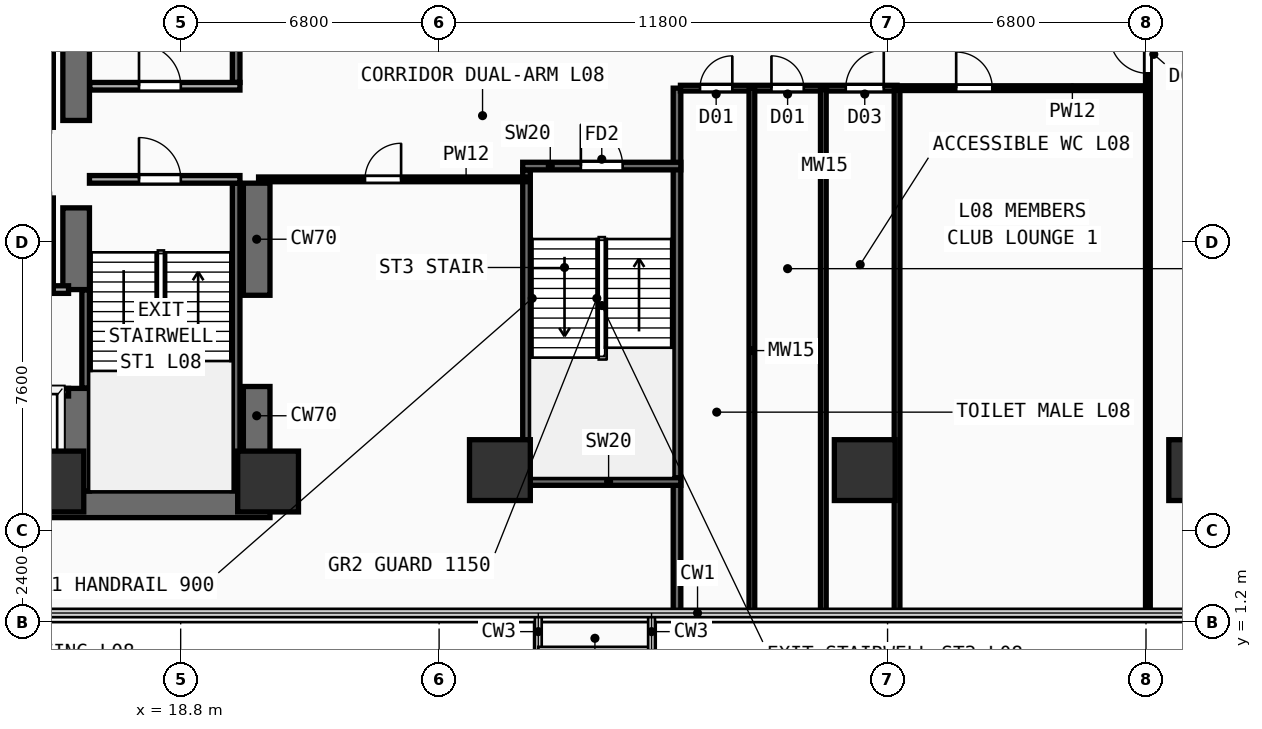
"""IFC4 building model, lengths in metres.
Left out: names, types, materials, properties, quantities, classifications, styles, units other than length and angle.
Written with IfcOpenShell. Run it as: python <this file> out.ifc"""

import sys

from ifc_helpers import new_model, si_unit, direction, frame, frame_2d, origin, origin_2d, place, context, subcontext, project, spatial, rectangle, extrude, element, fill, save


model = new_model("IFC4")
c1 = context("Model", 3, precision=1e-05, world=origin(), true_north=direction((0.0, 1.0)))
c2 = subcontext(c1, "Body", "Model", "MODEL_VIEW")
j1 = project(units=[si_unit("LENGTHUNIT", "METRE"), si_unit("PLANEANGLEUNIT", "RADIAN")], contexts=[c1])
p1 = place(None, origin())
s1 = spatial("IfcSite", under=j1, at=p1, CompositionType="ELEMENT")
p2 = place(p1, origin())
s2 = spatial("IfcBuilding", under=s1, at=p2, CompositionType="ELEMENT")
p3 = place(p2, frame((0.0, 0.0, 33.4)))
s3 = spatial("IfcBuildingStorey", under=s2, at=p3, CompositionType="ELEMENT", Elevation=33.4)
p4 = place(p3, frame((7.1, 4.3, 0.0), z_axis=(0.0, 0.0, 1.0), x_axis=(1.0, 0.0, 0.0)))
e1 = element("IfcWall", 1, at=p4, inside=s3, PredefinedType="SHEAR", context=c2, shape_type="SweptSolid", body=[
    extrude(rectangle(XDim=14.05, YDim=0.7, at=frame_2d((7.025, 0.0))), origin(), (0.0, 0.0, 1.0), 3.54),
])
p5 = place(p3, frame((20.8, 4.65, 0.0), z_axis=(0.0, 0.0, 1.0), x_axis=(0.0, 1.0, 0.0)))
e2 = element("IfcWall", 2, at=p5, inside=s3, PredefinedType="SHEAR", context=c2, shape_type="SweptSolid", body=[
    extrude(rectangle(XDim=2.75, YDim=0.7, at=frame_2d((1.375, 0.0))), origin(), (0.0, 0.0, 1.0), 3.54),
])
p6 = place(p3, frame((20.8, 9.8, 0.0), z_axis=(0.0, 0.0, 1.0), x_axis=(0.0, 1.0, 0.0)))
e3 = element("IfcWall", 3, at=p6, inside=s3, PredefinedType="SHEAR", context=c2, shape_type="SweptSolid", body=[
    extrude(rectangle(XDim=2.95, YDim=0.7, at=frame_2d((1.475, 0.0))), origin(), (0.0, 0.0, 1.0), 3.54),
])
p7 = place(p3, frame((16.05, 4.65, 0.0), z_axis=(0.0, 0.0, 1.0), x_axis=(0.0, 1.0, 0.0)))
e4 = element("IfcWall", 4, at=p7, inside=s3, PredefinedType="SHEAR", context=c2, shape_type="SweptSolid", body=[
    extrude(rectangle(XDim=2.7, YDim=0.7, at=frame_2d((1.35, 0.0))), origin(), (0.0, 0.0, 1.0), 3.54),
])
p8 = place(p3, frame((16.05, 9.95, 0.0), z_axis=(0.0, 0.0, 1.0), x_axis=(0.0, 1.0, 0.0)))
e5 = element("IfcWall", 5, at=p8, inside=s3, PredefinedType="SHEAR", context=c2, shape_type="SweptSolid", body=[
    extrude(rectangle(XDim=2.15, YDim=0.7, at=frame_2d((1.075, 0.0))), origin(), (0.0, 0.0, 1.0), 3.54),
])
p9 = place(p3, frame((16.05, 14.4, 0.0), z_axis=(0.0, 0.0, 1.0), x_axis=(0.0, 1.0, 0.0)))
e6 = element("IfcWall", 6, at=p9, inside=s3, PredefinedType="SHEAR", context=c2, shape_type="SweptSolid", body=[
    extrude(rectangle(XDim=9.1, YDim=0.7, at=frame_2d((4.55, 0.0))), origin(), (0.0, 0.0, 1.0), 3.54),
])
for number, where, z_axis, x_axis in (
    (7, (15.45, 4.9, 0.0), (0.0, 0.0, 1.0), (1.0, 0.0, 0.0)),
    (8, (21.1, 4.9, 0.0), (0.0, 0.0, 1.0), (1.0, 0.0, 0.0)),
    (9, (27.2, 5.2, 0.0), (0.0, 0.0, 1.0), (1.0, 0.0, 0.0)),
    (10, (36.8, 5.2, 0.0), (0.0, 0.0, 1.0), (1.0, 0.0, 0.0)),
    (11, (45.6, 5.2, 0.0), (0.0, 0.0, 1.0), (1.0, 0.0, 0.0)),
):
    element("IfcColumn", number, at=place(p3, frame(where, z_axis=z_axis, x_axis=x_axis)), inside=s3, PredefinedType="COLUMN", context=c2, shape_type="SweptSolid", body=[
        extrude(rectangle(XDim=1.6, YDim=1.6, at=origin_2d()), origin(), (0.0, 0.0, 1.0), 3.54),
    ])
p10 = place(p3, frame((16.3, 7.36, 0.0), z_axis=(0.0, 0.0, 1.0), x_axis=(0.0, 1.0, 0.0)))
e12 = element("IfcWall", 12, at=p10, inside=s3, PredefinedType="SHEAR", context=c2, shape_type="SweptSolid", body=[
    extrude(rectangle(XDim=2.58, YDim=0.2, at=frame_2d((1.29, 0.0))), origin(), (0.0, 0.0, 1.0), 3.54),
])
p11 = place(p3, frame((20.26, 4.66, 0.0), z_axis=(0.0, 0.0, 1.0), x_axis=(0.0, 1.0, 0.0)))
e13 = element("IfcWall", 13, at=p11, inside=s3, PredefinedType="SHEAR", context=c2, shape_type="SweptSolid", body=[
    extrude(rectangle(XDim=8.09, YDim=0.2, at=frame_2d((4.045, 0.0))), origin(), (0.0, 0.0, 1.0), 3.54),
])
p12 = place(p3, frame((16.4, 12.85, 0.0), z_axis=(0.0, 0.0, 1.0), x_axis=(1.0, 0.0, 0.0)))
e14 = element("IfcWall", 14, at=p12, inside=s3, PredefinedType="PARTITIONING", context=c2, shape_type="SweptSolid", body=[
    extrude(rectangle(XDim=3.96, YDim=0.2, at=frame_2d((1.98, 0.0))), origin(), (0.0, 0.0, 1.0), 3.54),
])
p13 = place(p12, frame((1.304, 0.0, 0.0)))
e15 = element("IfcOpeningElement", 15, at=p13, cuts=e14, PredefinedType="OPENING", context=c2, shape_type="SweptSolid", body=[
    extrude(rectangle(XDim=1.1, YDim=2.2, at=frame_2d((0.55, 1.1))), frame((0.0, 0.11, 0.0), z_axis=(0.0, -1.0, 0.0), x_axis=(1.0, 0.0, 0.0)), (0.0, 0.0, 1.0), 0.22),
])
p14 = place(p3, frame((20.26, 15.4, 0.0), z_axis=(0.0, 0.0, 1.0), x_axis=(0.0, 1.0, 0.0)))
e16 = element("IfcWall", 16, at=p14, inside=s3, PredefinedType="SHEAR", context=c2, shape_type="SweptSolid", body=[
    extrude(rectangle(XDim=8.09, YDim=0.2, at=frame_2d((4.045, 0.0))), origin(), (0.0, 0.0, 1.0), 3.54),
])
p15 = place(p3, frame((16.41, 15.3, 0.0), z_axis=(0.0, 0.0, 1.0), x_axis=(1.0, 0.0, 0.0)))
e17 = element("IfcWall", 17, at=p15, inside=s3, PredefinedType="PARTITIONING", context=c2, shape_type="SweptSolid", body=[
    extrude(rectangle(XDim=3.95, YDim=0.2, at=frame_2d((1.975, 0.0))), origin(), (0.0, 0.0, 1.0), 3.54),
])
p16 = place(p15, frame((1.294, 0.0, 0.0)))
e18 = element("IfcOpeningElement", 18, at=p16, cuts=e17, PredefinedType="OPENING", context=c2, shape_type="SweptSolid", body=[
    extrude(rectangle(XDim=1.1, YDim=2.2, at=frame_2d((0.55, 1.1))), frame((0.0, 0.11, 0.0), z_axis=(0.0, -1.0, 0.0), x_axis=(1.0, 0.0, 0.0)), (0.0, 0.0, 1.0), 0.22),
])
p17 = place(p3, frame((27.9, 5.0, 0.0), z_axis=(0.0, 0.0, 1.0), x_axis=(0.0, 1.0, 0.0)))
e19 = element("IfcWall", 19, at=p17, inside=s3, PredefinedType="SHEAR", context=c2, shape_type="SweptSolid", body=[
    extrude(rectangle(XDim=8.1, YDim=0.2, at=frame_2d((4.05, 0.0))), origin(), (0.0, 0.0, 1.0), 3.54),
])
p18 = place(p3, frame((31.86, 1.44, 0.0), z_axis=(0.0, 0.0, 1.0), x_axis=(0.0, 1.0, 0.0)))
e20 = element("IfcWall", 20, at=p18, inside=s3, PredefinedType="SHEAR", context=c2, shape_type="SweptSolid", body=[
    extrude(rectangle(XDim=13.81, YDim=0.2, at=frame_2d((6.905, 0.0))), origin(), (0.0, 0.0, 1.0), 3.54),
])
p19 = place(p3, frame((27.8, 4.9, 0.0), z_axis=(0.0, 0.0, 1.0), x_axis=(1.0, 0.0, 0.0)))
e21 = element("IfcWall", 21, at=p19, inside=s3, PredefinedType="SHEAR", context=c2, shape_type="SweptSolid", body=[
    extrude(rectangle(XDim=4.16, YDim=0.2, at=frame_2d((2.08, 0.0))), origin(), (0.0, 0.0, 1.0), 3.54),
])
p20 = place(p3, frame((27.8, 13.2, 0.0), z_axis=(0.0, 0.0, 1.0), x_axis=(1.0, 0.0, 0.0)))
e22 = element("IfcWall", 22, at=p20, inside=s3, PredefinedType="SHEAR", context=c2, shape_type="SweptSolid", body=[
    extrude(rectangle(XDim=4.16, YDim=0.2, at=frame_2d((2.08, 0.0))), origin(), (0.0, 0.0, 1.0), 3.54),
])
p21 = place(p20, frame((1.53, 0.0, 0.0)))
e23 = element("IfcOpeningElement", 23, at=p21, cuts=e22, PredefinedType="OPENING", context=c2, shape_type="SweptSolid", body=[
    extrude(rectangle(XDim=1.1, YDim=2.2, at=frame_2d((0.55, 1.1))), frame((0.0, 0.11, 0.0), z_axis=(0.0, -1.0, 0.0), x_axis=(1.0, 0.0, 0.0)), (0.0, 0.0, 1.0), 0.22),
])
p22 = place(p3, frame((7.5, 7.25, 0.0), z_axis=(0.0, 0.0, 1.0), x_axis=(1.0, 0.0, 0.0)))
e24 = element("IfcWall", 24, at=p22, inside=s3, PredefinedType="PARTITIONING", context=c2, shape_type="SweptSolid", body=[
    extrude(rectangle(XDim=8.35, YDim=0.2, at=frame_2d((4.175, 0.0))), origin(), (0.0, 0.0, 1.0), 3.54),
])
p23 = place(p22, frame((0.53, 0.0, 0.0)))
e25 = element("IfcOpeningElement", 25, at=p23, cuts=e24, PredefinedType="OPENING", context=c2, shape_type="SweptSolid", body=[
    extrude(rectangle(XDim=1.1, YDim=2.2, at=frame_2d((0.55, 1.1))), frame((0.0, 0.11, 0.0), z_axis=(0.0, -1.0, 0.0), x_axis=(1.0, 0.0, 0.0)), (0.0, 0.0, 1.0), 0.22),
])
p24 = place(p22, frame((2.37, 0.0, 0.0)))
e26 = element("IfcOpeningElement", 26, at=p24, cuts=e24, PredefinedType="OPENING", context=c2, shape_type="SweptSolid", body=[
    extrude(rectangle(XDim=1.1, YDim=2.2, at=frame_2d((0.55, 1.1))), frame((0.0, 0.11, 0.0), z_axis=(0.0, -1.0, 0.0), x_axis=(1.0, 0.0, 0.0)), (0.0, 0.0, 1.0), 0.22),
])
p25 = place(p22, frame((4.33, 0.0, 0.0)))
e27 = element("IfcOpeningElement", 27, at=p25, cuts=e24, PredefinedType="OPENING", context=c2, shape_type="SweptSolid", body=[
    extrude(rectangle(XDim=1.1, YDim=2.2, at=frame_2d((0.55, 1.1))), frame((0.0, 0.11, 0.0), z_axis=(0.0, -1.0, 0.0), x_axis=(1.0, 0.0, 0.0)), (0.0, 0.0, 1.0), 0.22),
])
p26 = place(p22, frame((6.5, 0.0, 0.0)))
e28 = element("IfcOpeningElement", 28, at=p26, cuts=e24, PredefinedType="OPENING", context=c2, shape_type="SweptSolid", body=[
    extrude(rectangle(XDim=1.1, YDim=2.2, at=frame_2d((0.55, 1.1))), frame((0.0, 0.11, 0.0), z_axis=(0.0, -1.0, 0.0), x_axis=(1.0, 0.0, 0.0)), (0.0, 0.0, 1.0), 0.22),
])
p27 = place(p3, frame((7.5, 9.95, 0.0), z_axis=(0.0, 0.0, 1.0), x_axis=(1.0, 0.0, 0.0)))
e29 = element("IfcWall", 29, at=p27, inside=s3, PredefinedType="PARTITIONING", context=c2, shape_type="SweptSolid", body=[
    extrude(rectangle(XDim=8.35, YDim=0.2, at=frame_2d((4.175, 0.0))), origin(), (0.0, 0.0, 1.0), 3.54),
])
p28 = place(p3, frame((15.35, 9.95, 0.0), z_axis=(0.0, 0.0, 1.0), x_axis=(0.0, 1.0, 0.0)))
e30 = element("IfcWall", 30, at=p28, inside=s3, PredefinedType="PARTITIONING", context=c2, shape_type="SweptSolid", body=[
    extrude(rectangle(XDim=2.41, YDim=0.2, at=frame_2d((1.205, 0.0))), origin(), (0.0, 0.0, 1.0), 3.54),
])
p29 = place(p3, frame((15.35, 14.22, 0.0), z_axis=(0.0, 0.0, 1.0), x_axis=(0.0, 1.0, 0.0)))
e31 = element("IfcWall", 31, at=p29, inside=s3, PredefinedType="PARTITIONING", context=c2, shape_type="SweptSolid", body=[
    extrude(rectangle(XDim=2.23, YDim=0.2, at=frame_2d((1.115, 0.0))), origin(), (0.0, 0.0, 1.0), 3.54),
])
p30 = place(p3, frame((31.95, 15.25, 0.0), z_axis=(0.0, 0.0, 1.0), x_axis=(1.0, 0.0, 0.0)))
e32 = element("IfcWall", 32, at=p30, inside=s3, PredefinedType="PLUMBINGWALL", context=c2, shape_type="SweptSolid", body=[
    extrude(rectangle(XDim=5.7, YDim=0.15, at=frame_2d((2.85, 0.0))), origin(), (0.0, 0.0, 1.0), 3.04),
])
p31 = place(p30, frame((0.515, 0.0, 0.0)))
e33 = element("IfcOpeningElement", 33, at=p31, cuts=e32, PredefinedType="OPENING", context=c2, shape_type="SweptSolid", body=[
    extrude(rectangle(XDim=0.85, YDim=2.15, at=frame_2d((0.425, 1.075))), frame((0.0, 0.085, 0.0), z_axis=(0.0, -1.0, 0.0), x_axis=(1.0, 0.0, 0.0)), (0.0, 0.0, 1.0), 0.17),
])
p32 = place(p30, frame((2.395, 0.0, 0.0)))
e34 = element("IfcOpeningElement", 34, at=p32, cuts=e32, PredefinedType="OPENING", context=c2, shape_type="SweptSolid", body=[
    extrude(rectangle(XDim=0.85, YDim=2.15, at=frame_2d((0.425, 1.075))), frame((0.0, 0.085, 0.0), z_axis=(0.0, -1.0, 0.0), x_axis=(1.0, 0.0, 0.0)), (0.0, 0.0, 1.0), 0.17),
])
p33 = place(p30, frame((4.35, 0.0, 0.0)))
e35 = element("IfcOpeningElement", 35, at=p33, cuts=e32, PredefinedType="OPENING", context=c2, shape_type="SweptSolid", body=[
    extrude(rectangle(XDim=1.0, YDim=2.2, at=frame_2d((0.5, 1.1))), frame((0.0, 0.085, 0.0), z_axis=(0.0, -1.0, 0.0), x_axis=(1.0, 0.0, 0.0)), (0.0, 0.0, 1.0), 0.17),
])
for number, where, z_axis, x_axis in (
    (36, (33.83, 1.44, 0.0), (0.0, 0.0, 1.0), (0.0, 1.0, 0.0)),
    (37, (35.71, 1.44, 0.0), (0.0, 0.0, 1.0), (0.0, 1.0, 0.0)),
    (38, (37.65, 1.44, 0.0), (0.0, 0.0, 1.0), (0.0, 1.0, 0.0)),
):
    element("IfcWall", number, at=place(p3, frame(where, z_axis=z_axis, x_axis=x_axis)), inside=s3, PredefinedType="PLUMBINGWALL", context=c2, shape_type="SweptSolid", body=[
        extrude(rectangle(XDim=13.81, YDim=0.15, at=frame_2d((6.905, 0.0))), origin(), (0.0, 0.0, 1.0), 3.54),
    ])
p34 = place(p3, frame((20.85, 12.85, 0.0), z_axis=(0.0, 0.0, 1.0), x_axis=(1.0, 0.0, 0.0)))
e39 = element("IfcWall", 39, at=p34, inside=s3, PredefinedType="PARTITIONING", context=c2, shape_type="SweptSolid", body=[
    extrude(rectangle(XDim=7.05, YDim=0.125, at=frame_2d((3.525, 0.0))), origin(), (0.0, 0.0, 1.0), 3.54),
])
p35 = place(p34, frame((2.8, 0.0, 0.0)))
e40 = element("IfcOpeningElement", 40, at=p35, cuts=e39, PredefinedType="OPENING", context=c2, shape_type="SweptSolid", body=[
    extrude(rectangle(XDim=0.95, YDim=2.15, at=frame_2d((0.475, 1.075))), frame((0.0, 0.073, 0.0), z_axis=(0.0, -1.0, 0.0), x_axis=(1.0, 0.0, 0.0)), (0.0, 0.0, 1.0), 0.145),
])
p36 = place(p3, frame((37.65, 15.25, 0.0), z_axis=(0.0, 0.0, 1.0), x_axis=(1.0, 0.0, 0.0)))
e41 = element("IfcWall", 41, at=p36, inside=s3, PredefinedType="PARTITIONING", context=c2, shape_type="SweptSolid", body=[
    extrude(rectangle(XDim=6.6, YDim=0.125, at=frame_2d((3.3, 0.0))), origin(), (0.0, 0.0, 1.0), 3.04),
])
p37 = place(p36, frame((1.556, 0.0, 0.0)))
e42 = element("IfcOpeningElement", 42, at=p37, cuts=e41, PredefinedType="OPENING", context=c2, shape_type="SweptSolid", body=[
    extrude(rectangle(XDim=0.95, YDim=2.15, at=frame_2d((0.475, 1.075))), frame((0.0, 0.073, 0.0), z_axis=(0.0, -1.0, 0.0), x_axis=(1.0, 0.0, 0.0)), (0.0, 0.0, 1.0), 0.145),
])
p38 = place(p3, frame((44.25, 1.44, 0.0), z_axis=(0.0, 0.0, 1.0), x_axis=(0.0, 1.0, 0.0)))
e43 = element("IfcWall", 43, at=p38, inside=s3, PredefinedType="PARTITIONING", context=c2, shape_type="SweptSolid", body=[
    extrude(rectangle(XDim=22.12, YDim=0.125, at=frame_2d((11.06, 0.0))), origin(), (0.0, 0.0, 1.0), 3.54),
])
p39 = place(p38, frame((14.2, 0.0, 0.0)))
e44 = element("IfcOpeningElement", 44, at=p39, cuts=e43, PredefinedType="OPENING", context=c2, shape_type="SweptSolid", body=[
    extrude(rectangle(XDim=1.0, YDim=2.2, at=frame_2d((0.5, 1.1))), frame((0.0, 0.073, 0.0), z_axis=(0.0, -1.0, 0.0), x_axis=(1.0, 0.0, 0.0)), (0.0, 0.0, 1.0), 0.145),
])
p40 = place(p13, frame((1.1, 0.0, 0.0), z_axis=(0.0, 0.0, 1.0), x_axis=(-1.0, 0.0, 0.0)))
e45 = element("IfcDoor", 45, at=p40, inside=s3, OperationType="SINGLE_SWING_RIGHT", PredefinedType="DOOR", context=c2, shape_type="SweptSolid", body=[
    extrude(rectangle(XDim=1.1, YDim=2.2, at=frame_2d((0.55, 1.1))), frame((0.0, 0.025, 0.0), z_axis=(0.0, -1.0, 0.0), x_axis=(1.0, 0.0, 0.0)), (0.0, 0.0, 1.0), 0.05),
])
fill(e15, e45)
p41 = place(p16, origin())
e46 = element("IfcDoor", 46, at=p41, inside=s3, OperationType="SINGLE_SWING_LEFT", PredefinedType="DOOR", context=c2, shape_type="SweptSolid", body=[
    extrude(rectangle(XDim=1.1, YDim=2.2, at=frame_2d((0.55, 1.1))), frame((0.0, 0.025, 0.0), z_axis=(0.0, -1.0, 0.0), x_axis=(1.0, 0.0, 0.0)), (0.0, 0.0, 1.0), 0.05),
])
fill(e18, e46)
p42 = place(p21, frame((1.1, 0.0, 0.0), z_axis=(0.0, 0.0, 1.0), x_axis=(-1.0, 0.0, 0.0)))
e47 = element("IfcDoor", 47, at=p42, inside=s3, OperationType="SINGLE_SWING_RIGHT", PredefinedType="DOOR", context=c2, shape_type="SweptSolid", body=[
    extrude(rectangle(XDim=1.1, YDim=2.2, at=frame_2d((0.55, 1.1))), frame((0.0, 0.025, 0.0), z_axis=(0.0, -1.0, 0.0), x_axis=(1.0, 0.0, 0.0)), (0.0, 0.0, 1.0), 0.05),
])
fill(e23, e47)
p43 = place(p31, origin())
e48 = element("IfcDoor", 48, at=p43, inside=s3, OperationType="SINGLE_SWING_RIGHT", PredefinedType="DOOR", context=c2, shape_type="SweptSolid", body=[
    extrude(rectangle(XDim=0.85, YDim=2.15, at=frame_2d((0.425, 1.075))), frame((0.0, 0.025, 0.0), z_axis=(0.0, -1.0, 0.0), x_axis=(1.0, 0.0, 0.0)), (0.0, 0.0, 1.0), 0.05),
])
fill(e33, e48)
p44 = place(p32, origin())
e49 = element("IfcDoor", 49, at=p44, inside=s3, OperationType="SINGLE_SWING_LEFT", PredefinedType="DOOR", context=c2, shape_type="SweptSolid", body=[
    extrude(rectangle(XDim=0.85, YDim=2.15, at=frame_2d((0.425, 1.075))), frame((0.0, 0.025, 0.0), z_axis=(0.0, -1.0, 0.0), x_axis=(1.0, 0.0, 0.0)), (0.0, 0.0, 1.0), 0.05),
])
fill(e34, e49)
p45 = place(p33, origin())
e50 = element("IfcDoor", 50, at=p45, inside=s3, OperationType="SINGLE_SWING_RIGHT", PredefinedType="DOOR", context=c2, shape_type="SweptSolid", body=[
    extrude(rectangle(XDim=1.0, YDim=2.2, at=frame_2d((0.5, 1.1))), frame((0.0, 0.025, 0.0), z_axis=(0.0, -1.0, 0.0), x_axis=(1.0, 0.0, 0.0)), (0.0, 0.0, 1.0), 0.05),
])
fill(e35, e50)
p46 = place(p35, origin())
e51 = element("IfcDoor", 51, at=p46, inside=s3, OperationType="SINGLE_SWING_RIGHT", PredefinedType="DOOR", context=c2, shape_type="SweptSolid", body=[
    extrude(rectangle(XDim=0.95, YDim=2.15, at=frame_2d((0.475, 1.075))), frame((0.0, 0.025, 0.0), z_axis=(0.0, -1.0, 0.0), x_axis=(1.0, 0.0, 0.0)), (0.0, 0.0, 1.0), 0.05),
])
fill(e40, e51)
p47 = place(p37, origin())
e52 = element("IfcDoor", 52, at=p47, inside=s3, OperationType="SINGLE_SWING_LEFT", PredefinedType="DOOR", context=c2, shape_type="SweptSolid", body=[
    extrude(rectangle(XDim=0.95, YDim=2.15, at=frame_2d((0.475, 1.075))), frame((0.0, 0.025, 0.0), z_axis=(0.0, -1.0, 0.0), x_axis=(1.0, 0.0, 0.0)), (0.0, 0.0, 1.0), 0.05),
])
fill(e42, e52)
p48 = place(p39, origin())
e53 = element("IfcDoor", 53, at=p48, inside=s3, OperationType="SINGLE_SWING_RIGHT", PredefinedType="DOOR", context=c2, shape_type="SweptSolid", body=[
    extrude(rectangle(XDim=1.0, YDim=2.2, at=frame_2d((0.5, 1.1))), frame((0.0, 0.025, 0.0), z_axis=(0.0, -1.0, 0.0), x_axis=(1.0, 0.0, 0.0)), (0.0, 0.0, 1.0), 0.05),
])
fill(e44, e53)
save(model, sys.argv[1])
